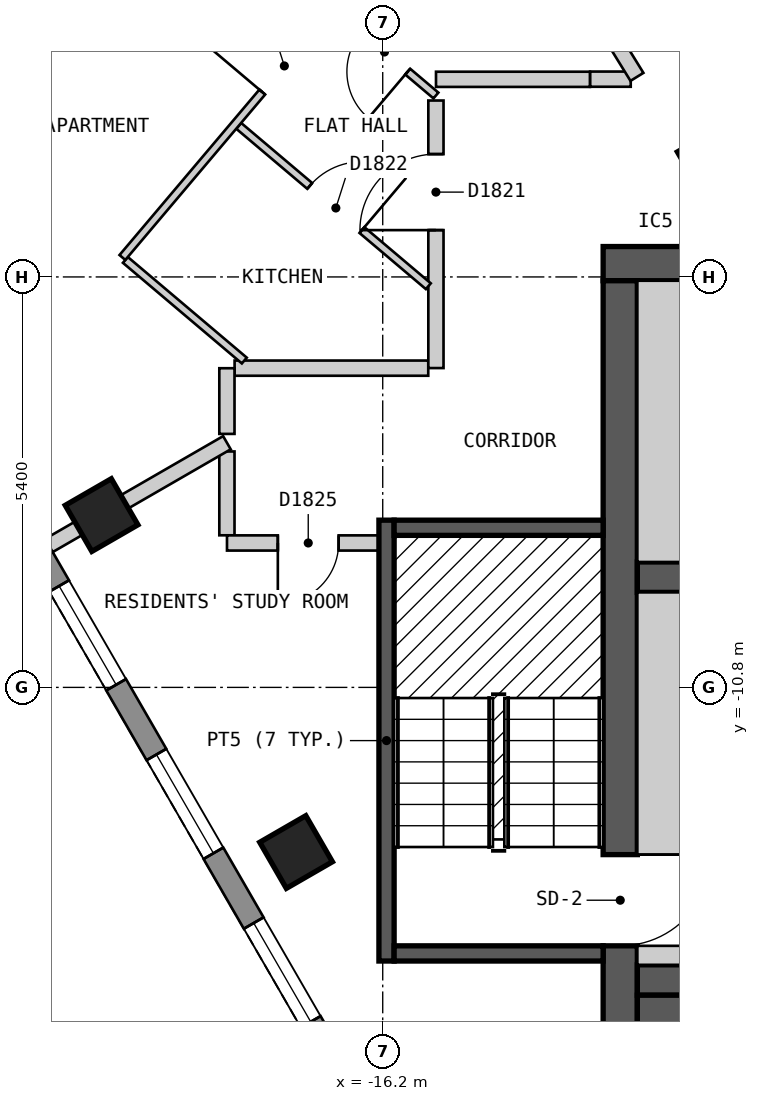
"""IFC4 building model, lengths in metres.
Left out: names, types, materials, properties, quantities, classifications, styles, units other than length and angle.
Written with IfcOpenShell. Run it as: python <this file> out.ifc"""

import sys

from ifc_helpers import new_model, si_unit, direction, frame, frame_2d, origin, origin_2d, place, context, subcontext, project, spatial, polyline, rectangle, outline, extrude, element, fill, save


model = new_model("IFC4")
c1 = context("Model", 3, precision=1e-05, world=origin(), true_north=direction((0.0, 1.0)))
c2 = subcontext(c1, "Body", "Model", "MODEL_VIEW")
j1 = project(units=[si_unit("LENGTHUNIT", "METRE"), si_unit("PLANEANGLEUNIT", "RADIAN")], contexts=[c1])
p1 = place(None, origin())
s1 = spatial("IfcSite", under=j1, at=p1, CompositionType="ELEMENT")
p2 = place(p1, origin())
s2 = spatial("IfcBuilding", under=s1, at=p2, CompositionType="ELEMENT")
p3 = place(p2, frame((0.0, 0.0, 208.8)))
s3 = spatial("IfcBuildingStorey", under=s2, at=p3, CompositionType="ELEMENT", Elevation=208.8)
for number, where, z_axis, x_axis in (
    (1, (-19.899, -8.533, 0.0), (0.0, 0.0, 1.0), (0.5, -0.866, 0.0)),
    (2, (-17.34, -12.966, 0.0), (0.0, 0.0, 1.0), (0.5, -0.866, 0.0)),
    (3, (-11.845, -3.883, 0.0), (0.0, 0.0, 1.0), (0.5, -0.866, 0.0)),
):
    element("IfcColumn", number, at=place(p3, frame(where, z_axis=z_axis, x_axis=x_axis)), inside=s3, PredefinedType="COLUMN", context=c2, shape_type="SweptSolid", body=[
        extrude(rectangle(XDim=0.7, YDim=0.7, at=origin_2d()), origin(), (0.0, 0.0, 1.0), 3.0),
    ])
p4 = place(p3, frame((-13.3, -5.225, 0.0), z_axis=(0.0, 0.0, 1.0), x_axis=(1.0, 0.0, 0.0)))
e4 = element("IfcWall", 4, at=p4, inside=s3, PredefinedType="SHEAR", context=c2, shape_type="SweptSolid", body=[
    extrude(rectangle(XDim=26.6, YDim=0.45, at=frame_2d((13.3, 0.0))), origin(), (0.0, 0.0, 1.0), 2.7),
])
p5 = place(p4, frame((23.65, 0.0, 0.0)))
e5 = element("IfcOpeningElement", 5, at=p5, cuts=e4, PredefinedType="OPENING", context=c2, shape_type="SweptSolid", body=[
    extrude(rectangle(XDim=1.2, YDim=2.1, at=frame_2d((0.6, 1.05))), frame((0.0, 0.235, 0.0), z_axis=(0.0, -1.0, 0.0), x_axis=(1.0, 0.0, 0.0)), (0.0, 0.0, 1.0), 0.47),
])
p6 = place(p3, frame((-13.075, -18.55, 0.0), z_axis=(0.0, 0.0, 1.0), x_axis=(0.0, 1.0, 0.0)))
e6 = element("IfcWall", 6, at=p6, inside=s3, PredefinedType="SHEAR", context=c2, shape_type="SweptSolid", body=[
    extrude(rectangle(XDim=13.1, YDim=0.45, at=frame_2d((6.55, 0.0))), origin(), (0.0, 0.0, 1.0), 2.7),
])
p7 = place(p6, frame((4.35, 0.0, 0.0)))
e7 = element("IfcOpeningElement", 7, at=p7, cuts=e6, PredefinedType="OPENING", context=c2, shape_type="SweptSolid", body=[
    extrude(rectangle(XDim=1.2, YDim=2.1, at=frame_2d((0.6, 1.05))), frame((0.0, 0.235, 0.0), z_axis=(0.0, -1.0, 0.0), x_axis=(1.0, 0.0, 0.0)), (0.0, 0.0, 1.0), 0.47),
])
p8 = place(p3, frame((-12.85, -14.65, 0.0), z_axis=(0.0, 0.0, 1.0), x_axis=(1.0, 0.0, 0.0)))
e8 = element("IfcWall", 8, at=p8, inside=s3, PredefinedType="SHEAR", context=c2, shape_type="SweptSolid", body=[
    extrude(rectangle(XDim=25.7, YDim=0.4, at=frame_2d((12.85, 0.0))), origin(), (0.0, 0.0, 1.0), 2.7),
])
p9 = place(p8, frame((2.05, 0.0, 0.0), z_axis=(0.0, 0.0, 1.0), x_axis=(-1.0, 0.0, 0.0)))
e9 = element("IfcOpeningElement", 9, at=p9, cuts=e8, PredefinedType="OPENING", context=c2, shape_type="SweptSolid", body=[
    extrude(rectangle(XDim=1.2, YDim=2.1, at=frame_2d((0.6, 1.05))), frame((0.0, 0.21, 0.0), z_axis=(0.0, -1.0, 0.0), x_axis=(1.0, 0.0, 0.0)), (0.0, 0.0, 1.0), 0.42),
])
p10 = place(p8, frame((24.9, 0.0, 0.0), z_axis=(0.0, 0.0, 1.0), x_axis=(-1.0, 0.0, 0.0)))
e10 = element("IfcOpeningElement", 10, at=p10, cuts=e8, PredefinedType="OPENING", context=c2, shape_type="SweptSolid", body=[
    extrude(rectangle(XDim=1.2, YDim=2.1, at=frame_2d((0.6, 1.05))), frame((0.0, 0.21, 0.0), z_axis=(0.0, -1.0, 0.0), x_axis=(1.0, 0.0, 0.0)), (0.0, 0.0, 1.0), 0.42),
])
p11 = place(p8, frame((10.0, 0.0, 0.0), z_axis=(0.0, 0.0, 1.0), x_axis=(-1.0, 0.0, 0.0)))
e11 = element("IfcOpeningElement", 11, at=p11, cuts=e8, PredefinedType="OPENING", context=c2, shape_type="SweptSolid", body=[
    extrude(rectangle(XDim=1.0, YDim=2.1, at=frame_2d((0.5, 1.05))), frame((0.0, 0.21, 0.0), z_axis=(0.0, -1.0, 0.0), x_axis=(1.0, 0.0, 0.0)), (0.0, 0.0, 1.0), 0.42),
])
p12 = place(p8, frame((16.4, 0.0, 0.0), z_axis=(0.0, 0.0, 1.0), x_axis=(-1.0, 0.0, 0.0)))
e12 = element("IfcOpeningElement", 12, at=p12, cuts=e8, PredefinedType="OPENING", context=c2, shape_type="SweptSolid", body=[
    extrude(rectangle(XDim=1.0, YDim=2.1, at=frame_2d((0.5, 1.05))), frame((0.0, 0.21, 0.0), z_axis=(0.0, -1.0, 0.0), x_axis=(1.0, 0.0, 0.0)), (0.0, 0.0, 1.0), 0.42),
])
p13 = place(p3, frame((-12.85, -9.35, 0.0), z_axis=(0.0, 0.0, 1.0), x_axis=(1.0, 0.0, 0.0)))
e13 = element("IfcWall", 13, at=p13, inside=s3, PredefinedType="SHEAR", context=c2, shape_type="SweptSolid", body=[
    extrude(rectangle(XDim=23.05, YDim=0.4, at=frame_2d((11.525, 0.0))), origin(), (0.0, 0.0, 1.0), 2.7),
])
p14 = place(p13, frame((1.45, 0.0, 0.0)))
e14 = element("IfcOpeningElement", 14, at=p14, cuts=e13, PredefinedType="OPENING", context=c2, shape_type="SweptSolid", body=[
    extrude(rectangle(XDim=1.1, YDim=2.1, at=frame_2d((0.55, 1.05))), frame((0.0, 0.21, 0.0), z_axis=(0.0, -1.0, 0.0), x_axis=(1.0, 0.0, 0.0)), (0.0, 0.0, 1.0), 0.42),
])
p15 = place(p13, frame((4.25, 0.0, 0.0)))
e15 = element("IfcOpeningElement", 15, at=p15, cuts=e13, PredefinedType="OPENING", context=c2, shape_type="SweptSolid", body=[
    extrude(rectangle(XDim=1.1, YDim=2.1, at=frame_2d((0.55, 1.05))), frame((0.0, 0.21, 0.0), z_axis=(0.0, -1.0, 0.0), x_axis=(1.0, 0.0, 0.0)), (0.0, 0.0, 1.0), 0.42),
])
p16 = place(p13, frame((7.05, 0.0, 0.0)))
e16 = element("IfcOpeningElement", 16, at=p16, cuts=e13, PredefinedType="OPENING", context=c2, shape_type="SweptSolid", body=[
    extrude(rectangle(XDim=1.1, YDim=2.1, at=frame_2d((0.55, 1.05))), frame((0.0, 0.21, 0.0), z_axis=(0.0, -1.0, 0.0), x_axis=(1.0, 0.0, 0.0)), (0.0, 0.0, 1.0), 0.42),
])
p17 = place(p13, frame((9.35, 0.0, 0.0)))
e17 = element("IfcOpeningElement", 17, at=p17, cuts=e13, PredefinedType="OPENING", context=c2, shape_type="SweptSolid", body=[
    extrude(rectangle(XDim=1.1, YDim=2.1, at=frame_2d((0.55, 1.05))), frame((0.0, 0.21, 0.0), z_axis=(0.0, -1.0, 0.0), x_axis=(1.0, 0.0, 0.0)), (0.0, 0.0, 1.0), 0.42),
])
p18 = place(p13, frame((11.65, 0.0, 0.0)))
e18 = element("IfcOpeningElement", 18, at=p18, cuts=e13, PredefinedType="OPENING", context=c2, shape_type="SweptSolid", body=[
    extrude(rectangle(XDim=1.1, YDim=2.1, at=frame_2d((0.55, 1.05))), frame((0.0, 0.21, 0.0), z_axis=(0.0, -1.0, 0.0), x_axis=(1.0, 0.0, 0.0)), (0.0, 0.0, 1.0), 0.42),
])
p19 = place(p13, frame((13.95, 0.0, 0.0)))
e19 = element("IfcOpeningElement", 19, at=p19, cuts=e13, PredefinedType="OPENING", context=c2, shape_type="SweptSolid", body=[
    extrude(rectangle(XDim=1.1, YDim=2.1, at=frame_2d((0.55, 1.05))), frame((0.0, 0.21, 0.0), z_axis=(0.0, -1.0, 0.0), x_axis=(1.0, 0.0, 0.0)), (0.0, 0.0, 1.0), 0.42),
])
p20 = place(p13, frame((16.25, 0.0, 0.0)))
e20 = element("IfcOpeningElement", 20, at=p20, cuts=e13, PredefinedType="OPENING", context=c2, shape_type="SweptSolid", body=[
    extrude(rectangle(XDim=1.1, YDim=2.1, at=frame_2d((0.55, 1.05))), frame((0.0, 0.21, 0.0), z_axis=(0.0, -1.0, 0.0), x_axis=(1.0, 0.0, 0.0)), (0.0, 0.0, 1.0), 0.42),
])
p21 = place(p13, frame((18.55, 0.0, 0.0)))
e21 = element("IfcOpeningElement", 21, at=p21, cuts=e13, PredefinedType="OPENING", context=c2, shape_type="SweptSolid", body=[
    extrude(rectangle(XDim=1.1, YDim=2.1, at=frame_2d((0.55, 1.05))), frame((0.0, 0.21, 0.0), z_axis=(0.0, -1.0, 0.0), x_axis=(1.0, 0.0, 0.0)), (0.0, 0.0, 1.0), 0.42),
])
p22 = place(p13, frame((20.95, 0.0, 0.0)))
e22 = element("IfcOpeningElement", 22, at=p22, cuts=e13, PredefinedType="OPENING", context=c2, shape_type="SweptSolid", body=[
    extrude(rectangle(XDim=1.1, YDim=2.1, at=frame_2d((0.55, 1.05))), frame((0.0, 0.21, 0.0), z_axis=(0.0, -1.0, 0.0), x_axis=(1.0, 0.0, 0.0)), (0.0, 0.0, 1.0), 0.42),
])
p23 = place(p3, frame((-23.599, -4.025, 0.0), z_axis=(0.0, 0.0, 1.0), x_axis=(0.500012653391, -0.866018098222, 0.0)))
e23 = element("IfcWall", 23, at=p23, inside=s3, PredefinedType="SOLIDWALL", context=c2, shape_type="SweptSolid", body=[
    extrude(outline(polyline([(0.0, -0.15), (16.628, -0.15), (16.548, 0.15), (0.08, 0.15), (0.0, -0.15)])), origin(), (0.0, 0.0, 1.0), 2.7),
])
p24 = place(p23, frame((1.164, 0.0, 0.15)))
e24 = element("IfcOpeningElement", 24, at=p24, cuts=e23, PredefinedType="OPENING", context=c2, shape_type="SweptSolid", body=[
    extrude(rectangle(XDim=1.5, YDim=2.1, at=frame_2d((0.75, 1.05))), frame((0.0, 0.16, 0.0), z_axis=(0.0, -1.0, 0.0), x_axis=(1.0, 0.0, 0.0)), (0.0, 0.0, 1.0), 0.32),
])
p25 = place(p23, frame((3.724, 0.0, 0.15)))
e25 = element("IfcOpeningElement", 25, at=p25, cuts=e23, PredefinedType="OPENING", context=c2, shape_type="SweptSolid", body=[
    extrude(rectangle(XDim=1.5, YDim=2.1, at=frame_2d((0.75, 1.05))), frame((0.0, 0.16, 0.0), z_axis=(0.0, -1.0, 0.0), x_axis=(1.0, 0.0, 0.0)), (0.0, 0.0, 1.0), 0.32),
])
p26 = place(p23, frame((6.283, 0.0, 0.15)))
e26 = element("IfcOpeningElement", 26, at=p26, cuts=e23, PredefinedType="OPENING", context=c2, shape_type="SweptSolid", body=[
    extrude(rectangle(XDim=1.5, YDim=2.1, at=frame_2d((0.75, 1.05))), frame((0.0, 0.16, 0.0), z_axis=(0.0, -1.0, 0.0), x_axis=(1.0, 0.0, 0.0)), (0.0, 0.0, 1.0), 0.32),
])
p27 = place(p23, frame((8.843, 0.0, 0.15)))
e27 = element("IfcOpeningElement", 27, at=p27, cuts=e23, PredefinedType="OPENING", context=c2, shape_type="SweptSolid", body=[
    extrude(rectangle(XDim=1.5, YDim=2.1, at=frame_2d((0.75, 1.05))), frame((0.0, 0.16, 0.0), z_axis=(0.0, -1.0, 0.0), x_axis=(1.0, 0.0, 0.0)), (0.0, 0.0, 1.0), 0.32),
])
p28 = place(p23, frame((11.403, 0.0, 0.15)))
e28 = element("IfcOpeningElement", 28, at=p28, cuts=e23, PredefinedType="OPENING", context=c2, shape_type="SweptSolid", body=[
    extrude(rectangle(XDim=1.5, YDim=2.1, at=frame_2d((0.75, 1.05))), frame((0.0, 0.16, 0.0), z_axis=(0.0, -1.0, 0.0), x_axis=(1.0, 0.0, 0.0)), (0.0, 0.0, 1.0), 0.32),
])
p29 = place(p23, frame((13.962, 0.0, 0.15)))
e29 = element("IfcOpeningElement", 29, at=p29, cuts=e23, PredefinedType="OPENING", context=c2, shape_type="SweptSolid", body=[
    extrude(rectangle(XDim=1.5, YDim=2.1, at=frame_2d((0.75, 1.05))), frame((0.0, 0.16, 0.0), z_axis=(0.0, -1.0, 0.0), x_axis=(1.0, 0.0, 0.0)), (0.0, 0.0, 1.0), 0.32),
])
p30 = place(p3, frame((-18.25, -7.696, 0.0), z_axis=(0.0, 0.0, 1.0), x_axis=(0.0, -1.0, 0.0)))
e30 = element("IfcWall", 30, at=p30, inside=s3, PredefinedType="PARTITIONING", context=c2, shape_type="SweptSolid", body=[
    extrude(rectangle(XDim=1.103, YDim=0.2, at=frame_2d((0.552, 0.0))), origin(), (0.0, 0.0, 1.0), 2.7),
])
p31 = place(p3, frame((-18.149, -6.6, 0.0), z_axis=(0.0, 0.0, 1.0), x_axis=(1.0, 0.0, 0.0)))
e31 = element("IfcWall", 31, at=p31, inside=s3, PredefinedType="PARTITIONING", context=c2, shape_type="SweptSolid", body=[
    extrude(rectangle(XDim=2.548, YDim=0.2, at=frame_2d((1.274, 0.0))), origin(), (0.0, 0.0, 1.0), 2.7),
])
p32 = place(p3, frame((-18.249, -8.9, 0.0), z_axis=(0.0, 0.0, 1.0), x_axis=(1.0, 0.0, 0.0)))
e32 = element("IfcWall", 32, at=p32, inside=s3, PredefinedType="PARTITIONING", context=c2, shape_type="SweptSolid", body=[
    extrude(rectangle(XDim=2.199, YDim=0.2, at=frame_2d((1.1, 0.0))), origin(), (0.0, 0.0, 1.0), 2.7),
])
p33 = place(p32, frame((0.669, 0.0, 0.0)))
e33 = element("IfcOpeningElement", 33, at=p33, cuts=e32, PredefinedType="OPENING", context=c2, shape_type="SweptSolid", body=[
    extrude(rectangle(XDim=0.8, YDim=2.1, at=frame_2d((0.4, 1.05))), frame((0.0, 0.11, 0.0), z_axis=(0.0, -1.0, 0.0), x_axis=(1.0, 0.0, 0.0)), (0.0, 0.0, 1.0), 0.22),
])
p34 = place(p3, frame((-13.472, -2.798, 0.0), z_axis=(0.0, 0.0, 1.0), x_axis=(1.0, 0.0, 0.0)))
e34 = element("IfcWall", 34, at=p34, inside=s3, PredefinedType="PARTITIONING", context=c2, shape_type="SweptSolid", body=[
    extrude(rectangle(XDim=0.535, YDim=0.2, at=frame_2d((0.268, 0.0))), origin(), (0.0, 0.0, 1.0), 2.7),
])
p35 = place(p3, frame((-15.499, -2.8, 0.0), z_axis=(0.0, 0.0, 1.0), x_axis=(1.0, 0.0, 0.0)))
e35 = element("IfcWall", 35, at=p35, inside=s3, PredefinedType="PARTITIONING", context=c2, shape_type="SweptSolid", body=[
    extrude(rectangle(XDim=2.025, YDim=0.2, at=frame_2d((1.012, 0.0))), origin(), (0.0, 0.0, 1.0), 2.7),
])
p36 = place(p3, frame((-15.5, -6.599, 0.0), z_axis=(0.0, 0.0, 1.0), x_axis=(0.0, 1.0, 0.0)))
e36 = element("IfcWall", 36, at=p36, inside=s3, PredefinedType="PARTITIONING", context=c2, shape_type="SweptSolid", body=[
    extrude(rectangle(XDim=3.52, YDim=0.2, at=frame_2d((1.76, 0.0))), origin(), (0.0, 0.0, 1.0), 2.7),
])
p37 = place(p36, frame((1.815, 0.0, 0.0)))
e37 = element("IfcOpeningElement", 37, at=p37, cuts=e36, PredefinedType="OPENING", context=c2, shape_type="SweptSolid", body=[
    extrude(rectangle(XDim=1.0, YDim=2.1, at=frame_2d((0.5, 1.05))), frame((0.0, 0.11, 0.0), z_axis=(0.0, -1.0, 0.0), x_axis=(1.0, 0.0, 0.0)), (0.0, 0.0, 1.0), 0.22),
])
p38 = place(p3, frame((-18.25, -7.465, 0.0), z_axis=(0.0, 0.0, 1.0), x_axis=(0.0, 1.0, 0.0)))
e38 = element("IfcWall", 38, at=p38, inside=s3, PredefinedType="PARTITIONING", context=c2, shape_type="SweptSolid", body=[
    extrude(rectangle(XDim=0.864, YDim=0.2, at=frame_2d((0.432, 0.0))), origin(), (0.0, 0.0, 1.0), 2.7),
])
p39 = place(p3, frame((-16.816, -1.9, 0.0), z_axis=(0.0, 0.0, 1.0), x_axis=(0.763509851459, -0.645796180482, 0.0)))
e39 = element("IfcWall", 39, at=p39, inside=s3, PredefinedType="PARTITIONING", context=c2, shape_type="SweptSolid", body=[
    extrude(rectangle(XDim=1.724, YDim=0.1, at=frame_2d((0.862, 0.0))), origin(), (0.0, 0.0, 1.0), 2.7),
])
p40 = place(p39, frame((0.437, 0.0, 0.0)))
e40 = element("IfcOpeningElement", 40, at=p40, cuts=e39, PredefinedType="OPENING", context=c2, shape_type="SweptSolid", body=[
    extrude(rectangle(XDim=0.8, YDim=2.1, at=frame_2d((0.4, 1.05))), frame((0.0, 0.06, 0.0), z_axis=(0.0, -1.0, 0.0), x_axis=(1.0, 0.0, 0.0)), (0.0, 0.0, 1.0), 0.12),
])
p41 = place(p3, frame((-18.095, -3.412, 0.0), z_axis=(0.0, 0.0, 1.0), x_axis=(0.763564811502, -0.645731196889, 0.0)))
e41 = element("IfcWall", 41, at=p41, inside=s3, PredefinedType="PARTITIONING", context=c2, shape_type="SweptSolid", body=[
    extrude(rectangle(XDim=3.267, YDim=0.1, at=frame_2d((1.634, 0.0))), origin(), (0.0, 0.0, 1.0), 2.7),
])
p42 = place(p41, frame((1.224, 0.0, 0.0)))
e42 = element("IfcOpeningElement", 42, at=p42, cuts=e41, PredefinedType="OPENING", context=c2, shape_type="SweptSolid", body=[
    extrude(rectangle(XDim=0.9, YDim=2.1, at=frame_2d((0.45, 1.05))), frame((0.0, 0.06, 0.0), z_axis=(0.0, -1.0, 0.0), x_axis=(1.0, 0.0, 0.0)), (0.0, 0.0, 1.0), 0.12),
])
p43 = place(p3, frame((-19.586, -5.176, 0.0), z_axis=(0.0, 0.0, 1.0), x_axis=(0.763435976882, -0.645883510551, 0.0)))
e43 = element("IfcWall", 43, at=p43, inside=s3, PredefinedType="PARTITIONING", context=c2, shape_type="SweptSolid", body=[
    extrude(rectangle(XDim=2.05, YDim=0.1, at=frame_2d((1.025, 0.0))), origin(), (0.0, 0.0, 1.0), 2.7),
])
p44 = place(p3, frame((-19.625, -5.144, 0.0), z_axis=(0.0, 0.0, 1.0), x_axis=(0.645668001073, 0.763618250431, 0.0)))
e44 = element("IfcWall", 44, at=p44, inside=s3, PredefinedType="PARTITIONING", context=c2, shape_type="SweptSolid", body=[
    extrude(rectangle(XDim=4.51, YDim=0.1, at=frame_2d((2.255, 0.0))), origin(), (0.0, 0.0, 1.0), 2.7),
])
p45 = place(p44, frame((2.85, 0.0, 0.0)))
e45 = element("IfcOpeningElement", 45, at=p45, cuts=e44, PredefinedType="OPENING", context=c2, shape_type="SweptSolid", body=[
    extrude(rectangle(XDim=0.9, YDim=2.1, at=frame_2d((0.45, 1.05))), frame((0.0, 0.06, 0.0), z_axis=(0.0, -1.0, 0.0), x_axis=(1.0, 0.0, 0.0)), (0.0, 0.0, 1.0), 0.12),
])
p46 = place(p3, frame((-13.496, -1.73, 0.0), z_axis=(0.0, 0.0, 1.0), x_axis=(0.525458799645, -0.850819046493, 0.0)))
e46 = element("IfcWall", 46, at=p46, inside=s3, PredefinedType="PARTITIONING", context=c2, shape_type="SweptSolid", body=[
    extrude(rectangle(XDim=1.22, YDim=0.2, at=frame_2d((0.61, 0.0))), origin(), (0.0, 0.0, 1.0), 2.7),
])
p47 = place(p3, frame((-20.592, -8.933, 0.0), z_axis=(0.0, 0.0, 1.0), x_axis=(0.866045775131, 0.499964714133, 0.0)))
e47 = element("IfcWall", 47, at=p47, inside=s3, PredefinedType="PARTITIONING", context=c2, shape_type="SweptSolid", body=[
    extrude(rectangle(XDim=2.704, YDim=0.2, at=frame_2d((1.352, 0.0))), origin(), (0.0, 0.0, 1.0), 2.7),
])
p48 = place(p3, frame((-16.15, -14.4, 0.0), z_axis=(0.0, 0.0, 1.0), x_axis=(0.0, 1.0, 0.0)))
e48 = element("IfcWall", 48, at=p48, inside=s3, PredefinedType="SOLIDWALL", context=c2, shape_type="SweptSolid", body=[
    extrude(rectangle(XDim=5.8, YDim=0.2, at=frame_2d((2.9, 0.0))), origin(), (0.0, 0.0, 1.0), 2.7),
])
for number, where, z_axis, x_axis in (
    (49, (-16.05, -14.3, 0.0), (0.0, 0.0, 1.0), (1.0, 0.0, 0.0)),
    (50, (-16.05, -8.7, 0.0), (0.0, 0.0, 1.0), (1.0, 0.0, 0.0)),
):
    element("IfcWall", number, at=place(p3, frame(where, z_axis=z_axis, x_axis=x_axis)), inside=s3, PredefinedType="SOLIDWALL", context=c2, shape_type="SweptSolid", body=[
        extrude(rectangle(XDim=2.75, YDim=0.2, at=frame_2d((1.375, 0.0))), origin(), (0.0, 0.0, 1.0), 2.7),
    ])
p49 = place(p3, frame((-12.475, -18.55, 0.0), z_axis=(0.0, 0.0, 1.0), x_axis=(0.0, 1.0, 0.0)))
e51 = element("IfcWall", 51, at=p49, inside=s3, PredefinedType="SOLIDWALL", context=c2, shape_type="SweptSolid", body=[
    extrude(rectangle(XDim=3.7, YDim=0.75, at=frame_2d((1.85, 0.0))), origin(), (0.0, 0.0, 1.0), 2.7),
])
p50 = place(p3, frame((-12.85, -14.325, 0.0), z_axis=(0.0, 0.0, 1.0), x_axis=(1.0, 0.0, 0.0)))
e52 = element("IfcWall", 52, at=p50, inside=s3, PredefinedType="PARTITIONING", context=c2, shape_type="SweptSolid", body=[
    extrude(rectangle(XDim=0.75, YDim=0.25, at=frame_2d((0.375, 0.0))), origin(), (0.0, 0.0, 1.0), 2.7),
])
p51 = place(p3, frame((-12.475, -13.0, 0.0), z_axis=(0.0, 0.0, 1.0), x_axis=(0.0, 1.0, 0.0)))
e53 = element("IfcWall", 53, at=p51, inside=s3, PredefinedType="PARTITIONING", context=c2, shape_type="SweptSolid", body=[
    extrude(rectangle(XDim=3.45, YDim=0.75, at=frame_2d((1.725, 0.0))), origin(), (0.0, 0.0, 1.0), 2.7),
])
p52 = place(p3, frame((-12.475, -9.15, 0.0), z_axis=(0.0, 0.0, 1.0), x_axis=(0.0, 1.0, 0.0)))
e54 = element("IfcWall", 54, at=p52, inside=s3, PredefinedType="SOLIDWALL", context=c2, shape_type="SweptSolid", body=[
    extrude(rectangle(XDim=3.7, YDim=0.75, at=frame_2d((1.85, 0.0))), origin(), (0.0, 0.0, 1.0), 2.7),
])
p53 = place(p26, origin())
e55 = element("IfcWindow", 55, at=p53, inside=s3, PartitioningType="SINGLE_PANEL", PredefinedType="WINDOW", context=c2, shape_type="SweptSolid", body=[
    extrude(rectangle(XDim=1.5, YDim=2.1, at=frame_2d((0.75, 1.05))), frame((0.0, 0.03, 0.0), z_axis=(0.0, -1.0, 0.0), x_axis=(1.0, 0.0, 0.0)), (0.0, 0.0, 1.0), 0.06),
])
fill(e26, e55)
p54 = place(p27, origin())
e56 = element("IfcWindow", 56, at=p54, inside=s3, PartitioningType="SINGLE_PANEL", PredefinedType="WINDOW", context=c2, shape_type="SweptSolid", body=[
    extrude(rectangle(XDim=1.5, YDim=2.1, at=frame_2d((0.75, 1.05))), frame((0.0, 0.03, 0.0), z_axis=(0.0, -1.0, 0.0), x_axis=(1.0, 0.0, 0.0)), (0.0, 0.0, 1.0), 0.06),
])
fill(e27, e56)
p55 = place(p28, origin())
e57 = element("IfcWindow", 57, at=p55, inside=s3, PartitioningType="SINGLE_PANEL", PredefinedType="WINDOW", context=c2, shape_type="SweptSolid", body=[
    extrude(rectangle(XDim=1.5, YDim=2.1, at=frame_2d((0.75, 1.05))), frame((0.0, 0.03, 0.0), z_axis=(0.0, -1.0, 0.0), x_axis=(1.0, 0.0, 0.0)), (0.0, 0.0, 1.0), 0.06),
])
fill(e28, e57)
p56 = place(p37, origin())
e58 = element("IfcDoor", 58, at=p56, inside=s3, OperationType="SINGLE_SWING_LEFT", PredefinedType="DOOR", context=c2, shape_type="SweptSolid", body=[
    extrude(rectangle(XDim=1.0, YDim=2.1, at=frame_2d((0.5, 1.05))), frame((0.0, 0.025, 0.0), z_axis=(0.0, -1.0, 0.0), x_axis=(1.0, 0.0, 0.0)), (0.0, 0.0, 1.0), 0.05),
])
fill(e37, e58)
p57 = place(p42, origin())
e59 = element("IfcDoor", 59, at=p57, inside=s3, OperationType="SINGLE_SWING_RIGHT", PredefinedType="DOOR", context=c2, shape_type="SweptSolid", body=[
    extrude(rectangle(XDim=0.9, YDim=2.1, at=frame_2d((0.45, 1.05))), frame((0.0, 0.025, 0.0), z_axis=(0.0, -1.0, 0.0), x_axis=(1.0, 0.0, 0.0)), (0.0, 0.0, 1.0), 0.05),
])
fill(e42, e59)
p58 = place(p45, origin())
e60 = element("IfcDoor", 60, at=p58, inside=s3, OperationType="SINGLE_SWING_LEFT", PredefinedType="DOOR", context=c2, shape_type="SweptSolid", body=[
    extrude(rectangle(XDim=0.9, YDim=2.1, at=frame_2d((0.45, 1.05))), frame((0.0, 0.025, 0.0), z_axis=(0.0, -1.0, 0.0), x_axis=(1.0, 0.0, 0.0)), (0.0, 0.0, 1.0), 0.05),
])
fill(e45, e60)
p59 = place(p40, origin())
e61 = element("IfcDoor", 61, at=p59, inside=s3, OperationType="SINGLE_SWING_RIGHT", PredefinedType="DOOR", context=c2, shape_type="SweptSolid", body=[
    extrude(rectangle(XDim=0.8, YDim=2.1, at=frame_2d((0.4, 1.05))), frame((0.0, 0.025, 0.0), z_axis=(0.0, -1.0, 0.0), x_axis=(1.0, 0.0, 0.0)), (0.0, 0.0, 1.0), 0.05),
])
fill(e40, e61)
p60 = place(p33, origin())
e62 = element("IfcDoor", 62, at=p60, inside=s3, OperationType="SINGLE_SWING_LEFT", PredefinedType="DOOR", context=c2, shape_type="SweptSolid", body=[
    extrude(rectangle(XDim=0.8, YDim=2.1, at=frame_2d((0.4, 1.05))), frame((0.0, 0.025, 0.0), z_axis=(0.0, -1.0, 0.0), x_axis=(1.0, 0.0, 0.0)), (0.0, 0.0, 1.0), 0.05),
])
fill(e33, e62)
p61 = place(p7, origin())
e63 = element("IfcDoor", 63, at=p61, inside=s3, OperationType="SINGLE_SWING_RIGHT", PredefinedType="DOOR", context=c2, shape_type="SweptSolid", body=[
    extrude(rectangle(XDim=1.2, YDim=2.1, at=frame_2d((0.6, 1.05))), frame((0.0, 0.025, 0.0), z_axis=(0.0, -1.0, 0.0), x_axis=(1.0, 0.0, 0.0)), (0.0, 0.0, 1.0), 0.05),
])
fill(e7, e63)
save(model, sys.argv[1])
